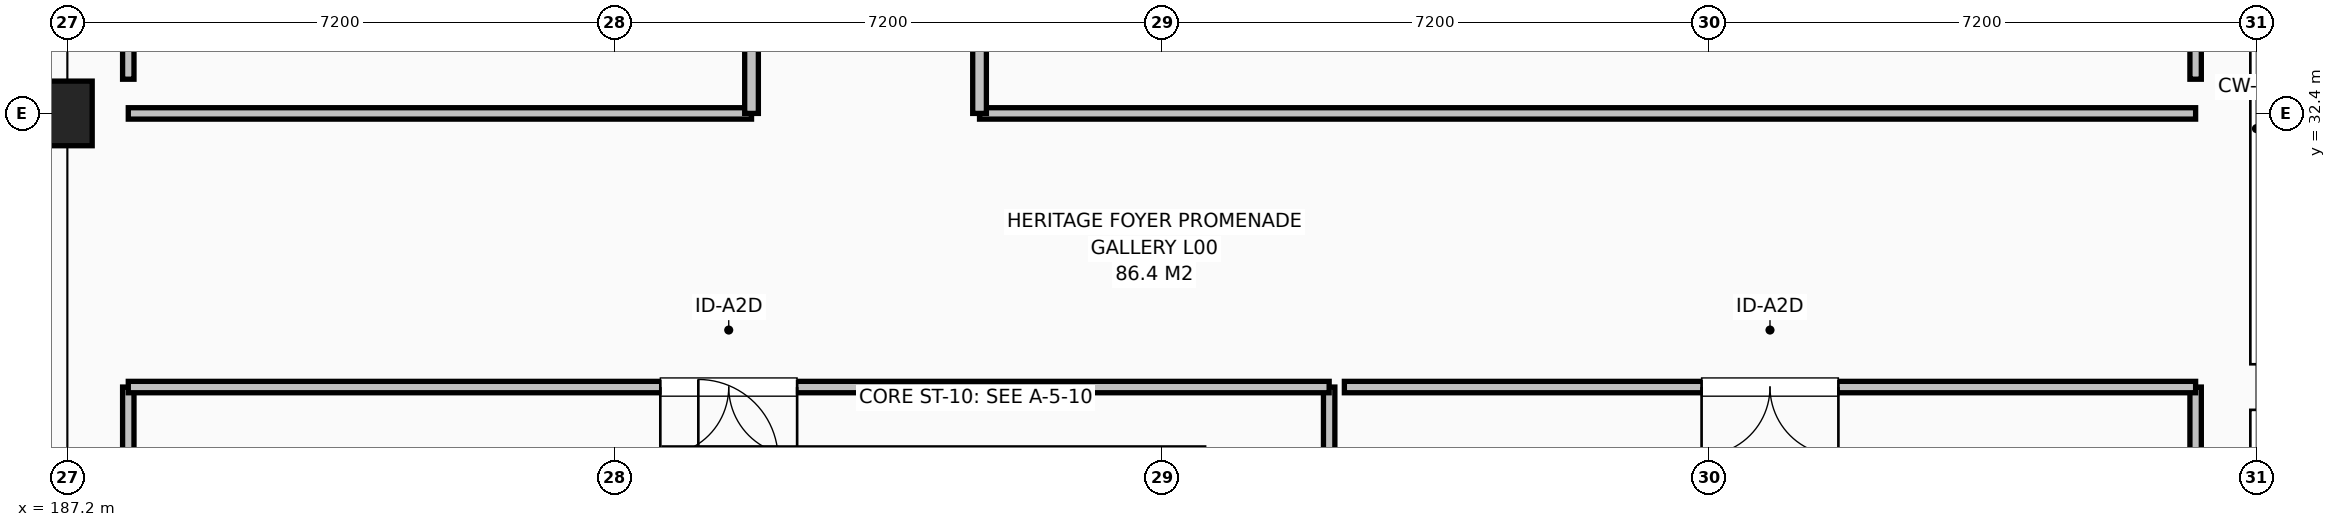
"""IFC4 building model, lengths in metres.
Left out: names, types, materials, properties, quantities, classifications, styles, units other than length and angle.
Written with IfcOpenShell. Run it as: python <this file> out.ifc"""

import sys

from ifc_helpers import new_model, si_unit, direction, frame, frame_2d, origin, origin_2d, place, context, subcontext, project, spatial, rectangle, extrude, element, fill, save


model = new_model("IFC4")
c1 = context("Model", 3, precision=1e-05, world=origin(), true_north=direction((0.0, 1.0)))
c2 = subcontext(c1, "Body", "Model", "MODEL_VIEW")
j1 = project(units=[si_unit("LENGTHUNIT", "METRE"), si_unit("PLANEANGLEUNIT", "RADIAN")], contexts=[c1])
p1 = place(None, origin())
s1 = spatial("IfcSite", under=j1, at=p1, CompositionType="ELEMENT")
p2 = place(p1, origin())
s2 = spatial("IfcBuilding", under=s1, at=p2, CompositionType="ELEMENT")
p3 = place(p2, origin())
s3 = spatial("IfcBuildingStorey", under=s2, at=p3, CompositionType="ELEMENT", Elevation=0.0)
p4 = place(p3, frame((187.2, 32.4, 0.0), z_axis=(0.0, 0.0, 1.0), x_axis=(1.0, 0.0, 0.0)))
e1 = element("IfcColumn", 1, at=p4, inside=s3, PredefinedType="COLUMN", context=c2, shape_type="SweptSolid", body=[
    extrude(rectangle(XDim=0.65, YDim=0.85, at=origin_2d()), origin(), (0.0, 0.0, 1.0), 4.8),
])
p5 = place(p3, frame((202.15, 27.85, 0.0), z_axis=(0.0, 0.0, 1.0), x_axis=(-1.0, 0.0, 0.0)))
e2 = element("IfcWall", 2, at=p5, inside=s3, PredefinedType="SHEAR", context=c2, shape_type="SweptSolid", body=[
    extrude(rectangle(XDim=7.1, YDim=0.3, at=frame_2d((3.55, 0.0))), origin(), (0.0, 0.0, 1.0), 4.55),
])
p6 = place(p5, frame((5.6, 0.0, 0.0)))
e3 = element("IfcOpeningElement", 3, at=p6, cuts=e2, PredefinedType="OPENING", context=c2, shape_type="SweptSolid", body=[
    extrude(rectangle(XDim=1.05, YDim=2.15, at=frame_2d((0.525, 1.075))), frame((0.0, 0.16, 0.0), z_axis=(0.0, -1.0, 0.0), x_axis=(1.0, 0.0, 0.0)), (0.0, 0.0, 1.0), 0.32),
])
for number, where, z_axis, x_axis in (
    (4, (203.8, 8.45, 0.0), (0.0, 0.0, 1.0), (0.0, 1.0, 0.0)),
    (5, (188.0, 28.8, 0.0), (0.0, 0.0, 1.0), (0.0, -1.0, 0.0)),
):
    element("IfcWall", number, at=place(p3, frame(where, z_axis=z_axis, x_axis=x_axis)), inside=s3, PredefinedType="PARTITIONING", context=c2, shape_type="SweptSolid", body=[
        extrude(rectangle(XDim=20.35, YDim=0.15, at=frame_2d((10.175, 0.0))), origin(), (0.0, 0.0, 1.0), 3.92),
    ])
p7 = place(p3, frame((188.0, 28.8, 0.0), z_axis=(0.0, 0.0, 1.0), x_axis=(1.0, 0.0, 0.0)))
e6 = element("IfcWall", 6, at=p7, inside=s3, PredefinedType="PARTITIONING", context=c2, shape_type="SweptSolid", body=[
    extrude(rectangle(XDim=15.8, YDim=0.15, at=frame_2d((7.9, 0.0))), origin(), (0.0, 0.0, 1.0), 4.1),
])
p8 = place(p7, frame((7.0, 0.0, 0.0)))
e7 = element("IfcOpeningElement", 7, at=p8, cuts=e6, PredefinedType="OPENING", context=c2, shape_type="SweptSolid", body=[
    extrude(rectangle(XDim=1.8, YDim=2.2, at=frame_2d((0.9, 1.1))), frame((0.0, 0.085, 0.0), z_axis=(0.0, -1.0, 0.0), x_axis=(1.0, 0.0, 0.0)), (0.0, 0.0, 1.0), 0.17),
])
p9 = place(p3, frame((215.2, 8.45, 0.0), z_axis=(0.0, 0.0, 1.0), x_axis=(0.0, 1.0, 0.0)))
e8 = element("IfcWall", 8, at=p9, inside=s3, PredefinedType="PARTITIONING", context=c2, shape_type="SweptSolid", body=[
    extrude(rectangle(XDim=20.35, YDim=0.15, at=frame_2d((10.175, 0.0))), origin(), (0.0, 0.0, 1.0), 3.92),
])
p10 = place(p3, frame((204.0, 28.8, 0.0), z_axis=(0.0, 0.0, 1.0), x_axis=(1.0, 0.0, 0.0)))
e9 = element("IfcWall", 9, at=p10, inside=s3, PredefinedType="PARTITIONING", context=c2, shape_type="SweptSolid", body=[
    extrude(rectangle(XDim=11.2, YDim=0.15, at=frame_2d((5.6, 0.0))), origin(), (0.0, 0.0, 1.0), 4.1),
])
p11 = place(p10, frame((4.7, 0.0, 0.0)))
e10 = element("IfcOpeningElement", 10, at=p11, cuts=e9, PredefinedType="OPENING", context=c2, shape_type="SweptSolid", body=[
    extrude(rectangle(XDim=1.8, YDim=2.2, at=frame_2d((0.9, 1.1))), frame((0.0, 0.085, 0.0), z_axis=(0.0, -1.0, 0.0), x_axis=(1.0, 0.0, 0.0)), (0.0, 0.0, 1.0), 0.17),
])
p12 = place(p3, frame((215.2, 32.4, 0.0), z_axis=(0.0, 0.0, 1.0), x_axis=(-1.0, 0.0, 0.0)))
e11 = element("IfcWall", 11, at=p12, inside=s3, PredefinedType="PARTITIONING", context=c2, shape_type="SweptSolid", body=[
    extrude(rectangle(XDim=16.0, YDim=0.15, at=frame_2d((8.0, 0.0))), origin(), (0.0, 0.0, 1.0), 4.1),
])
p13 = place(p3, frame((215.2, 32.85, 0.0), z_axis=(0.0, 0.0, 1.0), x_axis=(0.0, 1.0, 0.0)))
e12 = element("IfcWall", 12, at=p13, inside=s3, PredefinedType="PARTITIONING", context=c2, shape_type="SweptSolid", body=[
    extrude(rectangle(XDim=22.3, YDim=0.15, at=frame_2d((11.15, 0.0))), origin(), (0.0, 0.0, 1.0), 3.92),
])
p14 = place(p3, frame((199.2, 55.6, 0.0), z_axis=(0.0, 0.0, 1.0), x_axis=(0.0, -1.0, 0.0)))
e13 = element("IfcWall", 13, at=p14, inside=s3, PredefinedType="SOLIDWALL", context=c2, shape_type="SweptSolid", body=[
    extrude(rectangle(XDim=23.2, YDim=0.18, at=frame_2d((11.6, 0.0))), origin(), (0.0, 0.0, 1.0), 3.92),
])
p15 = place(p14, frame((11.1, 0.0, 0.0)))
e14 = element("IfcOpeningElement", 14, at=p15, cuts=e13, PredefinedType="OPENING", context=c2, shape_type="SweptSolid", body=[
    extrude(rectangle(XDim=1.0, YDim=2.15, at=frame_2d((0.5, 1.075))), frame((0.0, 0.1, 0.0), z_axis=(0.0, -1.0, 0.0), x_axis=(1.0, 0.0, 0.0)), (0.0, 0.0, 1.0), 0.2),
])
p16 = place(p3, frame((196.2, 32.4, 0.0), z_axis=(0.0, 0.0, 1.0), x_axis=(-1.0, 0.0, 0.0)))
e15 = element("IfcWall", 15, at=p16, inside=s3, PredefinedType="PARTITIONING", context=c2, shape_type="SweptSolid", body=[
    extrude(rectangle(XDim=8.2, YDim=0.15, at=frame_2d((4.1, 0.0))), origin(), (0.0, 0.0, 1.0), 4.1),
])
p17 = place(p3, frame((188.0, 44.55, 0.0), z_axis=(0.0, 0.0, 1.0), x_axis=(0.0, -1.0, 0.0)))
e16 = element("IfcWall", 16, at=p17, inside=s3, PredefinedType="PARTITIONING", context=c2, shape_type="SweptSolid", body=[
    extrude(rectangle(XDim=11.7, YDim=0.15, at=frame_2d((5.85, 0.0))), origin(), (0.0, 0.0, 1.0), 3.92),
])
p18 = place(p3, frame((196.2, 32.4, 0.0), z_axis=(0.0, 0.0, 1.0), x_axis=(0.0, 1.0, 0.0)))
e17 = element("IfcWall", 17, at=p18, inside=s3, PredefinedType="SOLIDWALL", context=c2, shape_type="SweptSolid", body=[
    extrude(rectangle(XDim=12.6, YDim=0.18, at=frame_2d((6.3, 0.0))), origin(), (0.0, 0.0, 1.0), 3.92),
])
p19 = place(p18, frame((5.79, 0.0, 0.0)))
e18 = element("IfcOpeningElement", 18, at=p19, cuts=e17, PredefinedType="OPENING", context=c2, shape_type="SweptSolid", body=[
    extrude(rectangle(XDim=1.02, YDim=2.15, at=frame_2d((0.51, 1.075))), frame((0.0, 0.1, 0.0), z_axis=(0.0, -1.0, 0.0), x_axis=(1.0, 0.0, 0.0)), (0.0, 0.0, 1.0), 0.2),
])
p20 = place(p8, origin())
e19 = element("IfcDoor", 19, at=p20, inside=s3, OperationType="DOUBLE_SWING_RIGHT", PredefinedType="DOOR", context=c2, shape_type="SweptSolid", body=[
    extrude(rectangle(XDim=1.8, YDim=2.2, at=frame_2d((0.9, 1.1))), frame((0.0, 0.025, 0.0), z_axis=(0.0, -1.0, 0.0), x_axis=(1.0, 0.0, 0.0)), (0.0, 0.0, 1.0), 0.05),
])
fill(e7, e19)
p21 = place(p11, origin())
e20 = element("IfcDoor", 20, at=p21, inside=s3, OperationType="DOUBLE_SWING_RIGHT", PredefinedType="DOOR", context=c2, shape_type="SweptSolid", body=[
    extrude(rectangle(XDim=1.8, YDim=2.2, at=frame_2d((0.9, 1.1))), frame((0.0, 0.025, 0.0), z_axis=(0.0, -1.0, 0.0), x_axis=(1.0, 0.0, 0.0)), (0.0, 0.0, 1.0), 0.05),
])
fill(e10, e20)
save(model, sys.argv[1])
